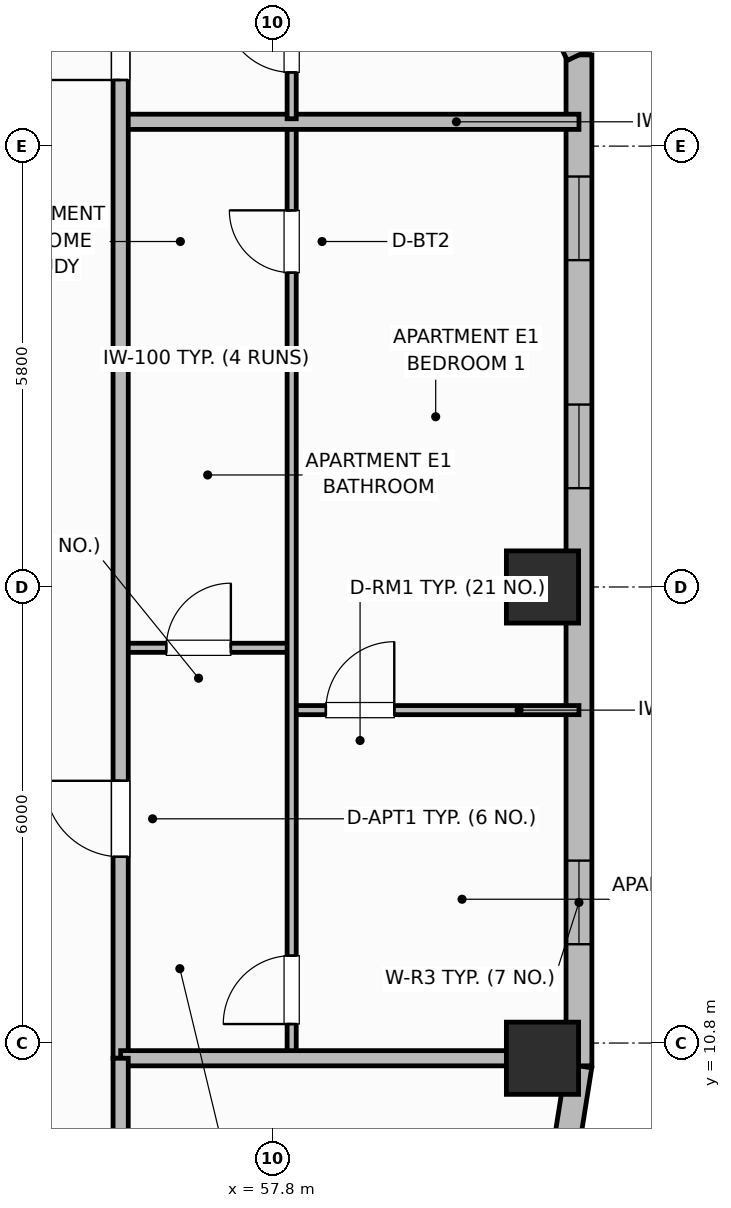
"""IFC4 building model, lengths in metres.
Left out: names, types, materials, properties, quantities, classifications, styles, units other than length and angle.
Written with IfcOpenShell. Run it as: python <this file> out.ifc"""

import sys

from ifc_helpers import new_model, si_unit, direction, frame, frame_2d, origin, origin_2d, place, context, subcontext, project, spatial, rectangle, extrude, element, fill, save


model = new_model("IFC4")
c1 = context("Model", 3, precision=1e-05, world=origin(), true_north=direction((0.0, 1.0)))
c2 = subcontext(c1, "Body", "Model", "MODEL_VIEW")
j1 = project(units=[si_unit("LENGTHUNIT", "METRE"), si_unit("PLANEANGLEUNIT", "RADIAN")], contexts=[c1])
p1 = place(None, origin())
s1 = spatial("IfcSite", under=j1, at=p1, CompositionType="ELEMENT")
p2 = place(p1, origin())
s2 = spatial("IfcBuilding", under=s1, at=p2, CompositionType="ELEMENT")
p3 = place(p2, frame((0.0, 0.0, 188.5)))
s3 = spatial("IfcBuildingStorey", under=s2, at=p3, CompositionType="ELEMENT", Elevation=188.5)
for number, where, z_axis, x_axis in (
    (1, (61.35, 10.6, 0.0), (0.0, 0.0, 1.0), (1.0, 0.0, 0.0)),
    (2, (61.35, 16.8, 0.0), (0.0, 0.0, 1.0), (1.0, 0.0, 0.0)),
):
    element("IfcColumn", number, at=place(p3, frame(where, z_axis=z_axis, x_axis=x_axis)), inside=s3, PredefinedType="COLUMN", context=c2, shape_type="SweptSolid", body=[
        extrude(rectangle(XDim=0.95, YDim=0.95, at=origin_2d()), origin(), (0.0, 0.0, 1.0), 3.7),
    ])
p4 = place(p3, frame((61.652, 9.378, 0.0), z_axis=(0.0, 0.0, 1.0), x_axis=(0.156514556949, 0.987675651954, 0.0)))
e3 = element("IfcWall", 3, at=p4, inside=s3, PredefinedType="SOLIDWALL", context=c2, shape_type="SweptSolid", body=[
    extrude(rectangle(XDim=1.135, YDim=0.34, at=frame_2d((0.568, 0.0))), origin(), (0.0, 0.0, 1.0), 2.72),
])
p5 = place(p3, frame((61.83, 10.5, 0.0), z_axis=(0.0, 0.0, 1.0), x_axis=(0.0, 1.0, 0.0)))
e4 = element("IfcWall", 4, at=p5, inside=s3, PredefinedType="SOLIDWALL", context=c2, shape_type="SweptSolid", body=[
    extrude(rectangle(XDim=13.3, YDim=0.34, at=frame_2d((6.65, 0.0))), origin(), (0.0, 0.0, 1.0), 2.72),
])
p6 = place(p5, frame((1.6, 0.0, 0.95)))
e5 = element("IfcOpeningElement", 5, at=p6, cuts=e4, PredefinedType="OPENING", context=c2, shape_type="SweptSolid", body=[
    extrude(rectangle(XDim=1.1, YDim=1.65, at=frame_2d((0.55, 0.825))), frame((0.0, 0.18, 0.0), z_axis=(0.0, -1.0, 0.0), x_axis=(1.0, 0.0, 0.0)), (0.0, 0.0, 1.0), 0.36),
])
p7 = place(p5, frame((7.6, 0.0, 0.95)))
e6 = element("IfcOpeningElement", 6, at=p7, cuts=e4, PredefinedType="OPENING", context=c2, shape_type="SweptSolid", body=[
    extrude(rectangle(XDim=1.1, YDim=1.65, at=frame_2d((0.55, 0.825))), frame((0.0, 0.18, 0.0), z_axis=(0.0, -1.0, 0.0), x_axis=(1.0, 0.0, 0.0)), (0.0, 0.0, 1.0), 0.36),
])
p8 = place(p5, frame((10.6, 0.0, 0.95)))
e7 = element("IfcOpeningElement", 7, at=p8, cuts=e4, PredefinedType="OPENING", context=c2, shape_type="SweptSolid", body=[
    extrude(rectangle(XDim=1.1, YDim=1.65, at=frame_2d((0.55, 0.825))), frame((0.0, 0.18, 0.0), z_axis=(0.0, -1.0, 0.0), x_axis=(1.0, 0.0, 0.0)), (0.0, 0.0, 1.0), 0.36),
])
p9 = place(p3, frame((61.83, 23.8, 0.0), z_axis=(0.0, 0.0, 1.0), x_axis=(-0.430753686581, 0.902469534941, 0.0)))
e8 = element("IfcWall", 8, at=p9, inside=s3, PredefinedType="SOLIDWALL", context=c2, shape_type="SweptSolid", body=[
    extrude(rectangle(XDim=2.438, YDim=0.34, at=frame_2d((1.219, 0.0))), origin(), (0.0, 0.0, 1.0), 2.72),
])
p10 = place(p9, frame((0.669, 0.0, 0.91)))
e9 = element("IfcOpeningElement", 9, at=p10, cuts=e8, PredefinedType="OPENING", context=c2, shape_type="SweptSolid", body=[
    extrude(rectangle(XDim=1.1, YDim=1.65, at=frame_2d((0.55, 0.825))), frame((0.0, 0.18, 0.0), z_axis=(0.0, -1.0, 0.0), x_axis=(1.0, 0.0, 0.0)), (0.0, 0.0, 1.0), 0.36),
])
p11 = place(p3, frame((55.8, 16.0, 0.0), z_axis=(0.0, 0.0, 1.0), x_axis=(1.0, 0.0, 0.0)))
e10 = element("IfcWall", 10, at=p11, inside=s3, PredefinedType="PARTITIONING", context=c2, shape_type="SweptSolid", body=[
    extrude(rectangle(XDim=2.25, YDim=0.12, at=frame_2d((1.125, 0.0))), origin(), (0.0, 0.0, 1.0), 2.55),
])
p12 = place(p11, frame((0.6, 0.0, 0.0)))
e11 = element("IfcOpeningElement", 11, at=p12, cuts=e10, PredefinedType="OPENING", context=c2, shape_type="SweptSolid", body=[
    extrude(rectangle(XDim=0.85, YDim=2.1, at=frame_2d((0.425, 1.05))), frame((0.0, 0.07, 0.0), z_axis=(0.0, -1.0, 0.0), x_axis=(1.0, 0.0, 0.0)), (0.0, 0.0, 1.0), 0.14),
])
p13 = place(p3, frame((55.8, 19.8, 0.0), z_axis=(0.0, 0.0, 1.0), x_axis=(1.0, 0.0, 0.0)))
e12 = element("IfcWall", 12, at=p13, inside=s3, PredefinedType="PARTITIONING", context=c2, shape_type="SweptSolid", body=[
    extrude(rectangle(XDim=2.25, YDim=0.1, at=frame_2d((1.125, 0.0))), origin(), (0.0, 0.0, 1.0), 2.55),
])
p14 = place(p3, frame((58.05, 15.18, 0.0), z_axis=(0.0, 0.0, 1.0), x_axis=(1.0, 0.0, 0.0)))
e13 = element("IfcWall", 13, at=p14, inside=s3, PredefinedType="PARTITIONING", context=c2, shape_type="SweptSolid", body=[
    extrude(rectangle(XDim=3.78, YDim=0.12, at=frame_2d((1.89, 0.0))), origin(), (0.0, 0.0, 1.0), 2.55),
])
p15 = place(p14, frame((0.45, 0.0, 0.0)))
e14 = element("IfcOpeningElement", 14, at=p15, cuts=e13, PredefinedType="OPENING", context=c2, shape_type="SweptSolid", body=[
    extrude(rectangle(XDim=0.9, YDim=2.1, at=frame_2d((0.45, 1.05))), frame((0.0, 0.07, 0.0), z_axis=(0.0, -1.0, 0.0), x_axis=(1.0, 0.0, 0.0)), (0.0, 0.0, 1.0), 0.14),
])
p16 = place(p3, frame((58.05, 10.64, 0.0), z_axis=(0.0, 0.0, 1.0), x_axis=(0.0, 1.0, 0.0)))
e15 = element("IfcWall", 15, at=p16, inside=s3, PredefinedType="PARTITIONING", context=c2, shape_type="SweptSolid", body=[
    extrude(rectangle(XDim=12.24, YDim=0.12, at=frame_2d((6.12, 0.0))), origin(), (0.0, 0.0, 1.0), 2.55),
])
p17 = place(p16, frame((0.41, 0.0, 0.0)))
e16 = element("IfcOpeningElement", 16, at=p17, cuts=e15, PredefinedType="OPENING", context=c2, shape_type="SweptSolid", body=[
    extrude(rectangle(XDim=0.9, YDim=2.1, at=frame_2d((0.45, 1.05))), frame((0.0, 0.07, 0.0), z_axis=(0.0, -1.0, 0.0), x_axis=(1.0, 0.0, 0.0)), (0.0, 0.0, 1.0), 0.14),
])
p18 = place(p16, frame((10.295, 0.0, 0.0)))
e17 = element("IfcOpeningElement", 17, at=p18, cuts=e15, PredefinedType="OPENING", context=c2, shape_type="SweptSolid", body=[
    extrude(rectangle(XDim=0.82, YDim=2.08, at=frame_2d((0.41, 1.04))), frame((0.0, 0.07, 0.0), z_axis=(0.0, -1.0, 0.0), x_axis=(1.0, 0.0, 0.0)), (0.0, 0.0, 1.0), 0.14),
])
p19 = place(p3, frame((55.8, 22.92, 0.0), z_axis=(0.0, 0.0, 1.0), x_axis=(1.0, 0.0, 0.0)))
e18 = element("IfcWall", 18, at=p19, inside=s3, PredefinedType="PARTITIONING", context=c2, shape_type="SweptSolid", body=[
    extrude(rectangle(XDim=6.03, YDim=0.2, at=frame_2d((3.015, 0.0))), origin(), (0.0, 0.0, 1.0), 2.55),
])
p20 = place(p3, frame((58.05, 22.96, 0.0), z_axis=(0.0, 0.0, 1.0), x_axis=(0.0, 1.0, 0.0)))
e19 = element("IfcWall", 19, at=p20, inside=s3, PredefinedType="PARTITIONING", context=c2, shape_type="SweptSolid", body=[
    extrude(rectangle(XDim=10.7, YDim=0.12, at=frame_2d((5.35, 0.0))), origin(), (0.0, 0.0, 1.0), 2.55),
])
p21 = place(p20, frame((0.61, 0.0, 0.0)))
e20 = element("IfcOpeningElement", 20, at=p21, cuts=e19, PredefinedType="OPENING", context=c2, shape_type="SweptSolid", body=[
    extrude(rectangle(XDim=0.9, YDim=2.1, at=frame_2d((0.45, 1.05))), frame((0.0, 0.07, 0.0), z_axis=(0.0, -1.0, 0.0), x_axis=(1.0, 0.0, 0.0)), (0.0, 0.0, 1.0), 0.14),
])
p22 = place(p3, frame((55.8, 10.6, 0.0), z_axis=(0.0, 0.0, 1.0), x_axis=(0.0, 1.0, 0.0)))
e21 = element("IfcWall", 21, at=p22, inside=s3, PredefinedType="PARTITIONING", context=c2, shape_type="SweptSolid", body=[
    extrude(rectangle(XDim=35.2, YDim=0.2, at=frame_2d((17.6, 0.0))), origin(), (0.0, 0.0, 1.0), 2.55),
])
p23 = place(p22, frame((2.65, 0.0, 0.0)))
e22 = element("IfcOpeningElement", 22, at=p23, cuts=e21, PredefinedType="OPENING", context=c2, shape_type="SweptSolid", body=[
    extrude(rectangle(XDim=1.0, YDim=2.15, at=frame_2d((0.5, 1.075))), frame((0.0, 0.11, 0.0), z_axis=(0.0, -1.0, 0.0), x_axis=(1.0, 0.0, 0.0)), (0.0, 0.0, 1.0), 0.22),
])
p24 = place(p22, frame((12.87, 0.0, 0.0)))
e23 = element("IfcOpeningElement", 23, at=p24, cuts=e21, PredefinedType="OPENING", context=c2, shape_type="SweptSolid", body=[
    extrude(rectangle(XDim=1.0, YDim=2.15, at=frame_2d((0.5, 1.075))), frame((0.0, 0.11, 0.0), z_axis=(0.0, -1.0, 0.0), x_axis=(1.0, 0.0, 0.0)), (0.0, 0.0, 1.0), 0.22),
])
p25 = place(p22, frame((23.65, 0.0, 0.0)))
e24 = element("IfcOpeningElement", 24, at=p25, cuts=e21, PredefinedType="OPENING", context=c2, shape_type="SweptSolid", body=[
    extrude(rectangle(XDim=1.0, YDim=2.15, at=frame_2d((0.5, 1.075))), frame((0.0, 0.11, 0.0), z_axis=(0.0, -1.0, 0.0), x_axis=(1.0, 0.0, 0.0)), (0.0, 0.0, 1.0), 0.22),
])
p26 = place(p3, frame((55.8, 10.6, 0.0), z_axis=(0.0, 0.0, 1.0), x_axis=(1.0, 0.0, 0.0)))
e25 = element("IfcWall", 25, at=p26, inside=s3, PredefinedType="PARTITIONING", context=c2, shape_type="SweptSolid", body=[
    extrude(rectangle(XDim=5.61, YDim=0.2, at=frame_2d((2.805, 0.0))), origin(), (0.0, 0.0, 1.0), 2.55),
])
p27 = place(p3, frame((55.8, 6.87, 0.0), z_axis=(0.0, 0.0, 1.0), x_axis=(0.0, 1.0, 0.0)))
e26 = element("IfcWall", 26, at=p27, inside=s3, PredefinedType="PARTITIONING", context=c2, shape_type="SweptSolid", body=[
    extrude(rectangle(XDim=3.73, YDim=0.2, at=frame_2d((1.865, 0.0))), origin(), (0.0, 0.0, 1.0), 2.55),
])
p28 = place(p6, origin())
e27 = element("IfcWindow", 27, at=p28, inside=s3, PartitioningType="SINGLE_PANEL", PredefinedType="WINDOW", context=c2, shape_type="SweptSolid", body=[
    extrude(rectangle(XDim=1.1, YDim=1.65, at=frame_2d((0.55, 0.825))), frame((0.0, 0.03, 0.0), z_axis=(0.0, -1.0, 0.0), x_axis=(1.0, 0.0, 0.0)), (0.0, 0.0, 1.0), 0.06),
])
fill(e5, e27)
p29 = place(p7, origin())
e28 = element("IfcWindow", 28, at=p29, inside=s3, PartitioningType="SINGLE_PANEL", PredefinedType="WINDOW", context=c2, shape_type="SweptSolid", body=[
    extrude(rectangle(XDim=1.1, YDim=1.65, at=frame_2d((0.55, 0.825))), frame((0.0, 0.03, 0.0), z_axis=(0.0, -1.0, 0.0), x_axis=(1.0, 0.0, 0.0)), (0.0, 0.0, 1.0), 0.06),
])
fill(e6, e28)
p30 = place(p8, origin())
e29 = element("IfcWindow", 29, at=p30, inside=s3, PartitioningType="SINGLE_PANEL", PredefinedType="WINDOW", context=c2, shape_type="SweptSolid", body=[
    extrude(rectangle(XDim=1.1, YDim=1.65, at=frame_2d((0.55, 0.825))), frame((0.0, 0.03, 0.0), z_axis=(0.0, -1.0, 0.0), x_axis=(1.0, 0.0, 0.0)), (0.0, 0.0, 1.0), 0.06),
])
fill(e7, e29)
p31 = place(p12, origin())
e30 = element("IfcDoor", 30, at=p31, inside=s3, OperationType="SINGLE_SWING_RIGHT", PredefinedType="DOOR", context=c2, shape_type="SweptSolid", body=[
    extrude(rectangle(XDim=0.85, YDim=2.1, at=frame_2d((0.425, 1.05))), frame((0.0, 0.025, 0.0), z_axis=(0.0, -1.0, 0.0), x_axis=(1.0, 0.0, 0.0)), (0.0, 0.0, 1.0), 0.05),
])
fill(e11, e30)
p32 = place(p15, origin())
e31 = element("IfcDoor", 31, at=p32, inside=s3, OperationType="SINGLE_SWING_RIGHT", PredefinedType="DOOR", context=c2, shape_type="SweptSolid", body=[
    extrude(rectangle(XDim=0.9, YDim=2.1, at=frame_2d((0.45, 1.05))), frame((0.0, 0.025, 0.0), z_axis=(0.0, -1.0, 0.0), x_axis=(1.0, 0.0, 0.0)), (0.0, 0.0, 1.0), 0.05),
])
fill(e14, e31)
p33 = place(p17, origin())
e32 = element("IfcDoor", 32, at=p33, inside=s3, OperationType="SINGLE_SWING_LEFT", PredefinedType="DOOR", context=c2, shape_type="SweptSolid", body=[
    extrude(rectangle(XDim=0.9, YDim=2.1, at=frame_2d((0.45, 1.05))), frame((0.0, 0.025, 0.0), z_axis=(0.0, -1.0, 0.0), x_axis=(1.0, 0.0, 0.0)), (0.0, 0.0, 1.0), 0.05),
])
fill(e16, e32)
p34 = place(p18, origin())
e33 = element("IfcDoor", 33, at=p34, inside=s3, OperationType="SINGLE_SWING_RIGHT", PredefinedType="DOOR", context=c2, shape_type="SweptSolid", body=[
    extrude(rectangle(XDim=0.82, YDim=2.08, at=frame_2d((0.41, 1.04))), frame((0.0, 0.025, 0.0), z_axis=(0.0, -1.0, 0.0), x_axis=(1.0, 0.0, 0.0)), (0.0, 0.0, 1.0), 0.05),
])
fill(e17, e33)
p35 = place(p21, origin())
e34 = element("IfcDoor", 34, at=p35, inside=s3, OperationType="SINGLE_SWING_RIGHT", PredefinedType="DOOR", context=c2, shape_type="SweptSolid", body=[
    extrude(rectangle(XDim=0.9, YDim=2.1, at=frame_2d((0.45, 1.05))), frame((0.0, 0.025, 0.0), z_axis=(0.0, -1.0, 0.0), x_axis=(1.0, 0.0, 0.0)), (0.0, 0.0, 1.0), 0.05),
])
fill(e20, e34)
p36 = place(p23, origin())
e35 = element("IfcDoor", 35, at=p36, inside=s3, OperationType="SINGLE_SWING_RIGHT", PredefinedType="DOOR", context=c2, shape_type="SweptSolid", body=[
    extrude(rectangle(XDim=1.0, YDim=2.15, at=frame_2d((0.5, 1.075))), frame((0.0, 0.025, 0.0), z_axis=(0.0, -1.0, 0.0), x_axis=(1.0, 0.0, 0.0)), (0.0, 0.0, 1.0), 0.05),
])
fill(e22, e35)
p37 = place(p24, origin())
e36 = element("IfcDoor", 36, at=p37, inside=s3, OperationType="SINGLE_SWING_LEFT", PredefinedType="DOOR", context=c2, shape_type="SweptSolid", body=[
    extrude(rectangle(XDim=1.0, YDim=2.15, at=frame_2d((0.5, 1.075))), frame((0.0, 0.025, 0.0), z_axis=(0.0, -1.0, 0.0), x_axis=(1.0, 0.0, 0.0)), (0.0, 0.0, 1.0), 0.05),
])
fill(e23, e36)
save(model, sys.argv[1])
